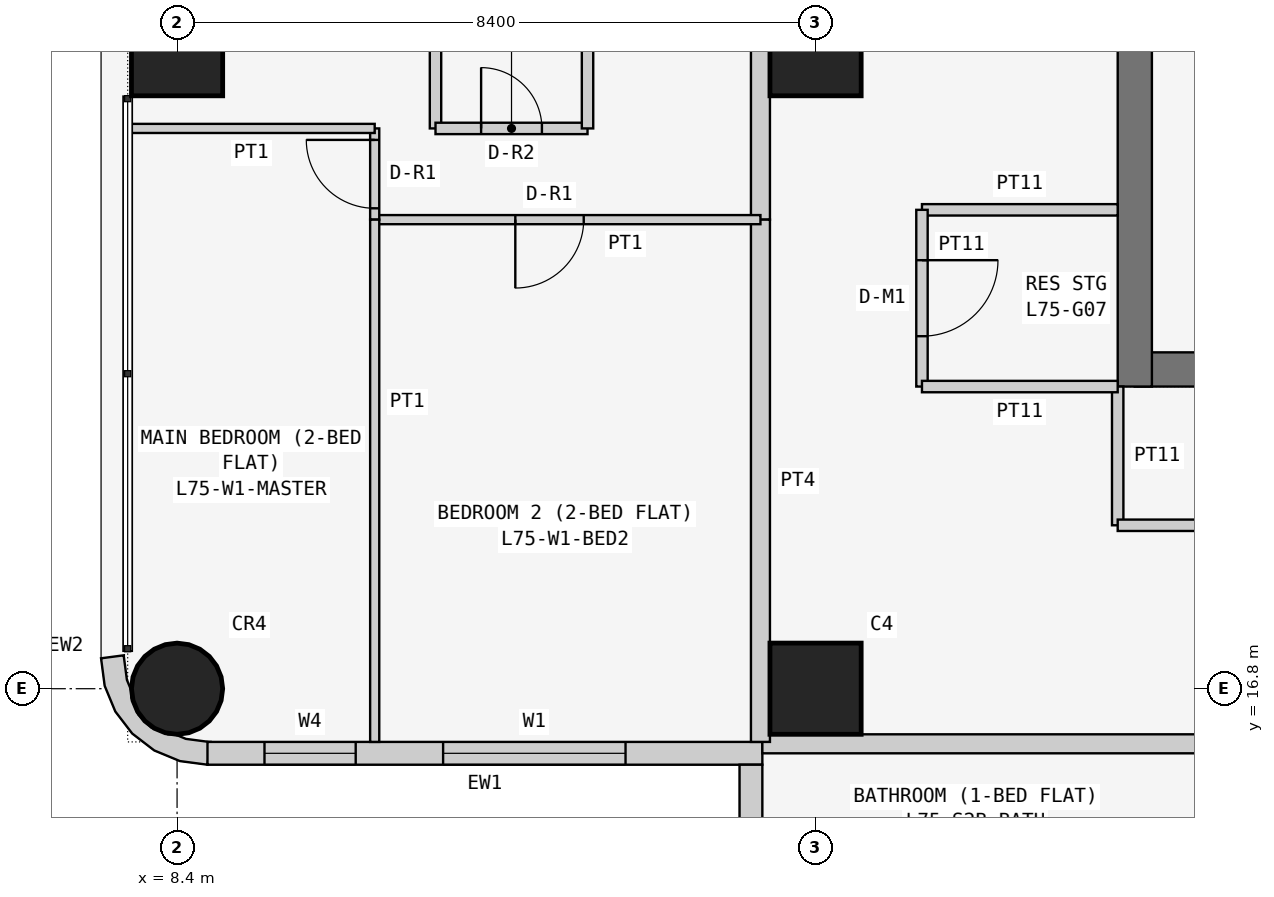
"""IFC4 building model, lengths in metres.
Left out: names, types, materials, properties, quantities, classifications, styles, units other than length and angle.
Written with IfcOpenShell. Run it as: python <this file> out.ifc"""

import sys

from ifc_helpers import new_model, si_unit, direction, frame, frame_2d, origin, origin_2d, place, context, subcontext, project, spatial, polyline, rectangle, circle, outline, extrude, element, fill, save


model = new_model("IFC4")
c1 = context("Model", 3, precision=1e-05, world=origin(), true_north=direction((0.0, 1.0)))
c2 = subcontext(c1, "Body", "Model", "MODEL_VIEW")
j1 = project(units=[si_unit("LENGTHUNIT", "METRE"), si_unit("PLANEANGLEUNIT", "RADIAN")], contexts=[c1])
p1 = place(None, origin())
s1 = spatial("IfcSite", under=j1, at=p1, CompositionType="ELEMENT")
p2 = place(p1, origin())
s2 = spatial("IfcBuilding", under=s1, at=p2, CompositionType="ELEMENT")
p3 = place(p2, frame((0.0, 0.0, 286.5)))
s3 = spatial("IfcBuildingStorey", under=s2, at=p3, CompositionType="ELEMENT", Elevation=286.5)
p4 = place(p3, frame((8.4, 16.8, 0.0), z_axis=(0.0, 0.0, 1.0), x_axis=(1.0, 0.0, 0.0)))
e1 = element("IfcColumn", 1, at=p4, inside=s3, PredefinedType="COLUMN", context=c2, shape_type="SweptSolid", body=[
    extrude(circle(Radius=0.6, at=origin_2d()), origin(), (0.0, 0.0, 1.0), 3.6),
])
for number, where, z_axis, x_axis in (
    (2, (8.4, 25.2, 0.0), (0.0, 0.0, 1.0), (1.0, 0.0, 0.0)),
    (3, (16.8, 16.8, 0.0), (0.0, 0.0, 1.0), (1.0, 0.0, 0.0)),
    (4, (16.8, 25.2, 0.0), (0.0, 0.0, 1.0), (1.0, 0.0, 0.0)),
):
    element("IfcColumn", number, at=place(p3, frame(where, z_axis=z_axis, x_axis=x_axis)), inside=s3, PredefinedType="COLUMN", context=c2, shape_type="SweptSolid", body=[
        extrude(rectangle(XDim=1.2, YDim=1.2, at=origin_2d()), origin(), (0.0, 0.0, 1.0), 3.6),
    ])
p5 = place(p3, frame((21.0, 21.0, 0.0), z_axis=(0.0, 0.0, 1.0), x_axis=(1.0, 0.0, 0.0)))
e5 = element("IfcWall", 5, at=p5, inside=s3, PredefinedType="SHEAR", context=c2, shape_type="SweptSolid", body=[
    extrude(rectangle(XDim=17.025, YDim=0.45, at=frame_2d((8.512, 0.0))), origin(), (0.0, 0.0, 1.0), 3.6),
])
p6 = place(p3, frame((21.0, 37.8, 0.0), z_axis=(0.0, 0.0, 1.0), x_axis=(0.0, -1.0, 0.0)))
e6 = element("IfcWall", 6, at=p6, inside=s3, PredefinedType="SHEAR", context=c2, shape_type="SweptSolid", body=[
    extrude(rectangle(XDim=17.025, YDim=0.45, at=frame_2d((8.513, 0.0))), origin(), (0.0, 0.0, 1.0), 3.6),
])
p7 = place(p6, frame((5.4, 0.0, 0.0)))
e7 = element("IfcOpeningElement", 7, at=p7, cuts=e6, PredefinedType="OPENING", context=c2, shape_type="SweptSolid", body=[
    extrude(rectangle(XDim=1.2, YDim=2.1, at=frame_2d((0.6, 1.05))), frame((0.0, 0.235, 0.0), z_axis=(0.0, -1.0, 0.0), x_axis=(1.0, 0.0, 0.0)), (0.0, 0.0, 1.0), 0.47),
])
p8 = place(p3, frame((8.8, 15.95, 0.0), z_axis=(0.0, 0.0, 1.0), x_axis=(1.0, 0.0, 0.0)))
e8 = element("IfcWall", 8, at=p8, inside=s3, PredefinedType="SOLIDWALL", context=c2, shape_type="SweptSolid", body=[
    extrude(rectangle(XDim=7.3, YDim=0.3, at=frame_2d((3.65, 0.0))), origin(), (0.0, 0.0, 1.0), 3.45),
])
p9 = place(p8, frame((3.1, 0.0, 0.9)))
e9 = element("IfcOpeningElement", 9, at=p9, cuts=e8, PredefinedType="OPENING", context=c2, shape_type="SweptSolid", body=[
    extrude(rectangle(XDim=2.4, YDim=1.5, at=frame_2d((1.2, 0.75))), frame((0.0, 0.16, 0.0), z_axis=(0.0, -1.0, 0.0), x_axis=(1.0, 0.0, 0.0)), (0.0, 0.0, 1.0), 0.32),
])
p10 = place(p8, frame((0.75, 0.0, 0.9)))
e10 = element("IfcOpeningElement", 10, at=p10, cuts=e8, PredefinedType="OPENING", context=c2, shape_type="SweptSolid", body=[
    extrude(rectangle(XDim=1.2, YDim=1.5, at=frame_2d((0.6, 0.75))), frame((0.0, 0.16, 0.0), z_axis=(0.0, -1.0, 0.0), x_axis=(1.0, 0.0, 0.0)), (0.0, 0.0, 1.0), 0.32),
])
p11 = place(p3, frame((15.95, 15.8, 0.0), z_axis=(0.0, 0.0, 1.0), x_axis=(0.0, -1.0, 0.0)))
e11 = element("IfcWall", 11, at=p11, inside=s3, PredefinedType="SOLIDWALL", context=c2, shape_type="SweptSolid", body=[
    extrude(rectangle(XDim=7.0, YDim=0.3, at=frame_2d((3.5, 0.0))), origin(), (0.0, 0.0, 1.0), 3.45),
])
p12 = place(p11, frame((1.5, 0.0, 0.9)))
e12 = element("IfcOpeningElement", 12, at=p12, cuts=e11, PredefinedType="OPENING", context=c2, shape_type="SweptSolid", body=[
    extrude(rectangle(XDim=2.4, YDim=1.5, at=frame_2d((1.2, 0.75))), frame((0.0, 0.16, 0.0), z_axis=(0.0, -1.0, 0.0), x_axis=(1.0, 0.0, 0.0)), (0.0, 0.0, 1.0), 0.32),
])
p13 = place(p11, frame((5.05, 0.0, 0.9)))
e13 = element("IfcOpeningElement", 13, at=p13, cuts=e11, PredefinedType="OPENING", context=c2, shape_type="SweptSolid", body=[
    extrude(rectangle(XDim=1.2, YDim=1.5, at=frame_2d((0.6, 0.75))), frame((0.0, 0.16, 0.0), z_axis=(0.0, -1.0, 0.0), x_axis=(1.0, 0.0, 0.0)), (0.0, 0.0, 1.0), 0.32),
])
p14 = place(p3, frame((7.824, 17.162, 0.0), z_axis=(0.0, 0.0, 1.0), x_axis=(-0.707106781187, -0.707106781187, 0.0)))
e14 = element("IfcWall", 14, at=p14, inside=s3, PredefinedType="SOLIDWALL", context=c2, shape_type="SweptSolid", body=[
    extrude(outline(polyline([(0.047, 1.454), (0.233, 1.212), (0.292, 1.069), (0.358, 1.003), (0.449, 0.782), (0.449, 0.543), (0.358, 0.323), (0.292, 0.257), (0.233, 0.114), (0.047, -0.129), (0.033, -0.143), (0.273, -0.327), (0.495, -0.037), (0.635, 0.301), (0.683, 0.663), (0.635, 1.025), (0.495, 1.363), (0.273, 1.653), (0.033, 1.469), (0.047, 1.454)])), origin(), (0.0, 0.0, 1.0), 3.45),
])
p15 = place(p3, frame((20.775, 20.775, 0.0), z_axis=(0.0, 0.0, 1.0), x_axis=(0.0, -1.0, 0.0)))
e15 = element("IfcWall", 15, at=p15, inside=s3, PredefinedType="PARTITIONING", context=c2, shape_type="SweptSolid", body=[
    extrude(rectangle(XDim=1.825, YDim=0.15, at=frame_2d((0.913, 0.0))), origin(), (0.0, 0.0, 1.0), 3.45),
])
p16 = place(p3, frame((20.775, 18.95, 0.0), z_axis=(0.0, 0.0, 1.0), x_axis=(1.0, 0.0, 0.0)))
e16 = element("IfcWall", 16, at=p16, inside=s3, PredefinedType="PARTITIONING", context=c2, shape_type="SweptSolid", body=[
    extrude(rectangle(XDim=4.425, YDim=0.15, at=frame_2d((2.212, 0.0))), origin(), (0.0, 0.0, 1.0), 3.45),
])
p17 = place(p16, frame((1.262, 0.0, 0.0)))
e17 = element("IfcOpeningElement", 17, at=p17, cuts=e16, PredefinedType="OPENING", context=c2, shape_type="SweptSolid", body=[
    extrude(rectangle(XDim=1.0, YDim=2.1, at=frame_2d((0.5, 1.05))), frame((0.0, 0.085, 0.0), z_axis=(0.0, -1.0, 0.0), x_axis=(1.0, 0.0, 0.0)), (0.0, 0.0, 1.0), 0.17),
])
p18 = place(p3, frame((20.775, 23.1, 0.0), z_axis=(0.0, 0.0, 1.0), x_axis=(-1.0, 0.0, 0.0)))
e18 = element("IfcWall", 18, at=p18, inside=s3, PredefinedType="PARTITIONING", context=c2, shape_type="SweptSolid", body=[
    extrude(rectangle(XDim=2.575, YDim=0.15, at=frame_2d((1.288, 0.0))), origin(), (0.0, 0.0, 1.0), 3.45),
])
p19 = place(p3, frame((18.2, 23.1, 0.0), z_axis=(0.0, 0.0, 1.0), x_axis=(0.0, -1.0, 0.0)))
e19 = element("IfcWall", 19, at=p19, inside=s3, PredefinedType="PARTITIONING", context=c2, shape_type="SweptSolid", body=[
    extrude(rectangle(XDim=2.325, YDim=0.15, at=frame_2d((1.163, 0.0))), origin(), (0.0, 0.0, 1.0), 3.45),
])
p20 = place(p19, frame((0.663, 0.0, 0.0)))
e20 = element("IfcOpeningElement", 20, at=p20, cuts=e19, PredefinedType="OPENING", context=c2, shape_type="SweptSolid", body=[
    extrude(rectangle(XDim=1.0, YDim=2.1, at=frame_2d((0.5, 1.05))), frame((0.0, 0.085, 0.0), z_axis=(0.0, -1.0, 0.0), x_axis=(1.0, 0.0, 0.0)), (0.0, 0.0, 1.0), 0.17),
])
p21 = place(p3, frame((18.2, 20.775, 0.0), z_axis=(0.0, 0.0, 1.0), x_axis=(1.0, 0.0, 0.0)))
e21 = element("IfcWall", 21, at=p21, inside=s3, PredefinedType="PARTITIONING", context=c2, shape_type="SweptSolid", body=[
    extrude(rectangle(XDim=2.575, YDim=0.15, at=frame_2d((1.288, 0.0))), origin(), (0.0, 0.0, 1.0), 3.45),
])
p22 = place(p3, frame((22.571, 16.075, 0.0), z_axis=(0.0, 0.0, 1.0), x_axis=(-1.0, 0.0, 0.0)))
e22 = element("IfcWall", 22, at=p22, inside=s3, PredefinedType="PARTITIONING", context=c2, shape_type="SweptSolid", body=[
    extrude(rectangle(XDim=6.471, YDim=0.25, at=frame_2d((3.235, 0.0))), origin(), (0.0, 0.0, 1.0), 3.45),
])
p23 = place(p3, frame((16.075, 22.971, 0.0), z_axis=(0.0, 0.0, 1.0), x_axis=(0.0, 1.0, 0.0)))
e23 = element("IfcWall", 23, at=p23, inside=s3, PredefinedType="PARTITIONING", context=c2, shape_type="SweptSolid", body=[
    extrude(rectangle(XDim=6.429, YDim=0.25, at=frame_2d((3.214, 0.0))), origin(), (0.0, 0.0, 1.0), 3.45),
])
p24 = place(p23, frame((4.929, 0.0, 0.0)))
e24 = element("IfcOpeningElement", 24, at=p24, cuts=e23, PredefinedType="OPENING", context=c2, shape_type="SweptSolid", body=[
    extrude(rectangle(XDim=1.0, YDim=2.1, at=frame_2d((0.5, 1.05))), frame((0.0, 0.135, 0.0), z_axis=(0.0, -1.0, 0.0), x_axis=(1.0, 0.0, 0.0)), (0.0, 0.0, 1.0), 0.27),
])
p25 = place(p3, frame((16.075, 16.1, 0.0), z_axis=(0.0, 0.0, 1.0), x_axis=(0.0, 1.0, 0.0)))
e25 = element("IfcWall", 25, at=p25, inside=s3, PredefinedType="PARTITIONING", context=c2, shape_type="SweptSolid", body=[
    extrude(rectangle(XDim=6.871, YDim=0.25, at=frame_2d((3.436, 0.0))), origin(), (0.0, 0.0, 1.0), 3.45),
])
p26 = place(p3, frame((11.8, 29.4, 0.0), z_axis=(0.0, 0.0, 1.0), x_axis=(0.0, -1.0, 0.0)))
e26 = element("IfcWall", 26, at=p26, inside=s3, PredefinedType="PARTITIONING", context=c2, shape_type="SweptSolid", body=[
    extrude(rectangle(XDim=5.229, YDim=0.15, at=frame_2d((2.615, 0.0))), origin(), (0.0, 0.0, 1.0), 3.45),
])
p27 = place(p3, frame((11.8, 24.171, 0.0), z_axis=(0.0, 0.0, 1.0), x_axis=(1.0, 0.0, 0.0)))
e27 = element("IfcWall", 27, at=p27, inside=s3, PredefinedType="PARTITIONING", context=c2, shape_type="SweptSolid", body=[
    extrude(rectangle(XDim=2.0, YDim=0.15, at=frame_2d((1.0, 0.0))), origin(), (0.0, 0.0, 1.0), 3.45),
])
p28 = place(p27, frame((0.6, 0.0, 0.0)))
e28 = element("IfcOpeningElement", 28, at=p28, cuts=e27, PredefinedType="OPENING", context=c2, shape_type="SweptSolid", body=[
    extrude(rectangle(XDim=0.8, YDim=2.1, at=frame_2d((0.4, 1.05))), frame((0.0, 0.085, 0.0), z_axis=(0.0, -1.0, 0.0), x_axis=(1.0, 0.0, 0.0)), (0.0, 0.0, 1.0), 0.17),
])
p29 = place(p3, frame((13.8, 24.171, 0.0), z_axis=(0.0, 0.0, 1.0), x_axis=(0.0, 1.0, 0.0)))
e29 = element("IfcWall", 29, at=p29, inside=s3, PredefinedType="PARTITIONING", context=c2, shape_type="SweptSolid", body=[
    extrude(rectangle(XDim=5.229, YDim=0.15, at=frame_2d((2.615, 0.0))), origin(), (0.0, 0.0, 1.0), 3.45),
])
p30 = place(p3, frame((16.075, 22.971, 0.0), z_axis=(0.0, 0.0, 1.0), x_axis=(-1.0, 0.0, 0.0)))
e30 = element("IfcWall", 30, at=p30, inside=s3, PredefinedType="PARTITIONING", context=c2, shape_type="SweptSolid", body=[
    extrude(rectangle(XDim=5.075, YDim=0.12, at=frame_2d((2.538, 0.0))), origin(), (0.0, 0.0, 1.0), 3.45),
])
p31 = place(p30, frame((2.325, 0.0, 0.0)))
e31 = element("IfcOpeningElement", 31, at=p31, cuts=e30, PredefinedType="OPENING", context=c2, shape_type="SweptSolid", body=[
    extrude(rectangle(XDim=0.9, YDim=2.1, at=frame_2d((0.45, 1.05))), frame((0.0, 0.07, 0.0), z_axis=(0.0, -1.0, 0.0), x_axis=(1.0, 0.0, 0.0)), (0.0, 0.0, 1.0), 0.14),
])
p32 = place(p3, frame((11.0, 22.971, 0.0), z_axis=(0.0, 0.0, 1.0), x_axis=(0.0, 1.0, 0.0)))
e32 = element("IfcWall", 32, at=p32, inside=s3, PredefinedType="PARTITIONING", context=c2, shape_type="SweptSolid", body=[
    extrude(rectangle(XDim=1.2, YDim=0.12, at=frame_2d((0.6, 0.0))), origin(), (0.0, 0.0, 1.0), 3.45),
])
p33 = place(p32, frame((0.149, 0.0, 0.0)))
e33 = element("IfcOpeningElement", 33, at=p33, cuts=e32, PredefinedType="OPENING", context=c2, shape_type="SweptSolid", body=[
    extrude(rectangle(XDim=0.9, YDim=2.1, at=frame_2d((0.45, 1.05))), frame((0.0, 0.07, 0.0), z_axis=(0.0, -1.0, 0.0), x_axis=(1.0, 0.0, 0.0)), (0.0, 0.0, 1.0), 0.14),
])
p34 = place(p3, frame((11.0, 24.171, 0.0), z_axis=(0.0, 0.0, 1.0), x_axis=(-1.0, 0.0, 0.0)))
e34 = element("IfcWall", 34, at=p34, inside=s3, PredefinedType="PARTITIONING", context=c2, shape_type="SweptSolid", body=[
    extrude(rectangle(XDim=3.25, YDim=0.12, at=frame_2d((1.625, 0.0))), origin(), (0.0, 0.0, 1.0), 3.45),
])
p35 = place(p3, frame((11.0, 22.971, 0.0), z_axis=(0.0, 0.0, 1.0), x_axis=(0.0, -1.0, 0.0)))
e35 = element("IfcWall", 35, at=p35, inside=s3, PredefinedType="PARTITIONING", context=c2, shape_type="SweptSolid", body=[
    extrude(rectangle(XDim=6.871, YDim=0.12, at=frame_2d((3.436, 0.0))), origin(), (0.0, 0.0, 1.0), 3.45),
])
p36 = place(p9, origin())
e36 = element("IfcWindow", 36, at=p36, inside=s3, PartitioningType="SINGLE_PANEL", PredefinedType="WINDOW", context=c2, shape_type="SweptSolid", body=[
    extrude(rectangle(XDim=2.4, YDim=1.5, at=frame_2d((1.2, 0.75))), frame((0.0, 0.03, 0.0), z_axis=(0.0, -1.0, 0.0), x_axis=(1.0, 0.0, 0.0)), (0.0, 0.0, 1.0), 0.06),
])
fill(e9, e36)
p37 = place(p10, origin())
e37 = element("IfcWindow", 37, at=p37, inside=s3, PartitioningType="SINGLE_PANEL", PredefinedType="WINDOW", context=c2, shape_type="SweptSolid", body=[
    extrude(rectangle(XDim=1.2, YDim=1.5, at=frame_2d((0.6, 0.75))), frame((0.0, 0.03, 0.0), z_axis=(0.0, -1.0, 0.0), x_axis=(1.0, 0.0, 0.0)), (0.0, 0.0, 1.0), 0.06),
])
fill(e10, e37)
p38 = place(p20, origin())
e38 = element("IfcDoor", 38, at=p38, inside=s3, OperationType="SINGLE_SWING_LEFT", PredefinedType="DOOR", context=c2, shape_type="SweptSolid", body=[
    extrude(rectangle(XDim=1.0, YDim=2.1, at=frame_2d((0.5, 1.05))), frame((0.0, 0.025, 0.0), z_axis=(0.0, -1.0, 0.0), x_axis=(1.0, 0.0, 0.0)), (0.0, 0.0, 1.0), 0.05),
])
fill(e20, e38)
p39 = place(p28, origin())
e39 = element("IfcDoor", 39, at=p39, inside=s3, OperationType="SINGLE_SWING_LEFT", PredefinedType="DOOR", context=c2, shape_type="SweptSolid", body=[
    extrude(rectangle(XDim=0.8, YDim=2.1, at=frame_2d((0.4, 1.05))), frame((0.0, 0.025, 0.0), z_axis=(0.0, -1.0, 0.0), x_axis=(1.0, 0.0, 0.0)), (0.0, 0.0, 1.0), 0.05),
])
fill(e28, e39)
p40 = place(p31, origin())
e40 = element("IfcDoor", 40, at=p40, inside=s3, OperationType="SINGLE_SWING_RIGHT", PredefinedType="DOOR", context=c2, shape_type="SweptSolid", body=[
    extrude(rectangle(XDim=0.9, YDim=2.1, at=frame_2d((0.45, 1.05))), frame((0.0, 0.025, 0.0), z_axis=(0.0, -1.0, 0.0), x_axis=(1.0, 0.0, 0.0)), (0.0, 0.0, 1.0), 0.05),
])
fill(e31, e40)
p41 = place(p33, origin())
e41 = element("IfcDoor", 41, at=p41, inside=s3, OperationType="SINGLE_SWING_RIGHT", PredefinedType="DOOR", context=c2, shape_type="SweptSolid", body=[
    extrude(rectangle(XDim=0.9, YDim=2.1, at=frame_2d((0.45, 1.05))), frame((0.0, 0.025, 0.0), z_axis=(0.0, -1.0, 0.0), x_axis=(1.0, 0.0, 0.0)), (0.0, 0.0, 1.0), 0.05),
])
fill(e33, e41)
save(model, sys.argv[1])
